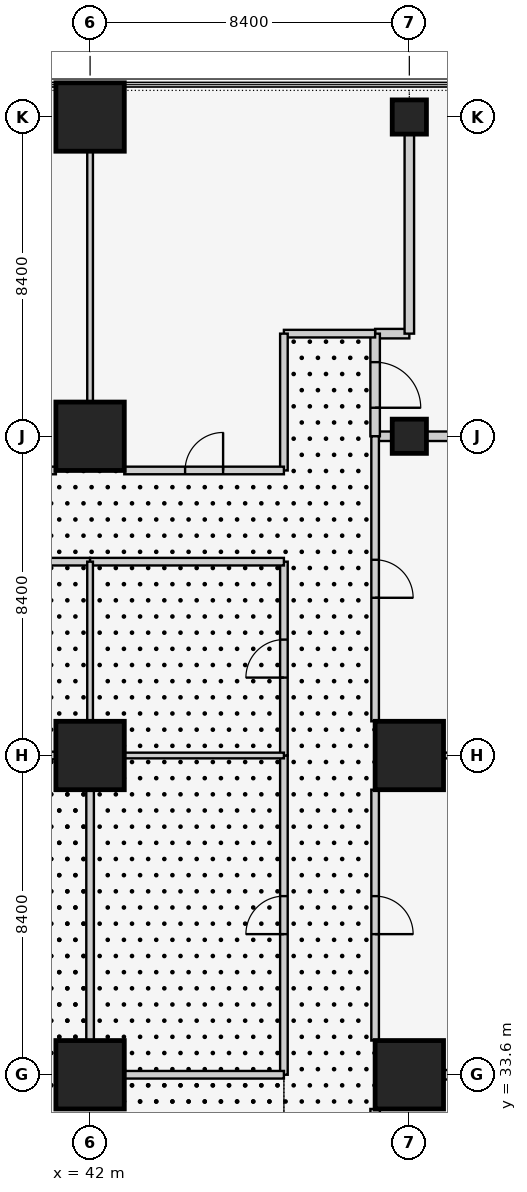
"""IFC4 building model, lengths in metres.
Left out: names, types, materials, properties, quantities, classifications, styles, units other than length and angle.
Written with IfcOpenShell. Run it as: python <this file> out.ifc"""

import sys

from ifc_helpers import new_model, si_unit, direction, frame, frame_2d, origin, origin_2d, place, context, subcontext, project, spatial, rectangle, extrude, element, fill, save


model = new_model("IFC4")
c1 = context("Model", 3, precision=1e-05, world=origin(), true_north=direction((0.0, 1.0)))
c2 = subcontext(c1, "Body", "Model", "MODEL_VIEW")
j1 = project(units=[si_unit("LENGTHUNIT", "METRE"), si_unit("PLANEANGLEUNIT", "RADIAN")], contexts=[c1])
p1 = place(None, origin())
s1 = spatial("IfcSite", under=j1, at=p1, CompositionType="ELEMENT")
p2 = place(p1, origin())
s2 = spatial("IfcBuilding", under=s1, at=p2, CompositionType="ELEMENT")
p3 = place(p2, frame((0.0, 0.0, 6.0)))
s3 = spatial("IfcBuildingStorey", under=s2, at=p3, CompositionType="ELEMENT", Elevation=6.0)
for number, where, z_axis, x_axis in (
    (1, (42.0, 33.6, 0.0), (0.0, 0.0, 1.0), (1.0, 0.0, 0.0)),
    (2, (42.0, 42.0, 0.0), (0.0, 0.0, 1.0), (1.0, 0.0, 0.0)),
    (3, (42.0, 50.4, 0.0), (0.0, 0.0, 1.0), (1.0, 0.0, 0.0)),
    (4, (42.0, 58.8, 0.0), (0.0, 0.0, 1.0), (1.0, 0.0, 0.0)),
    (5, (50.4, 33.6, 0.0), (0.0, 0.0, 1.0), (1.0, 0.0, 0.0)),
    (6, (50.4, 42.0, 0.0), (0.0, 0.0, 1.0), (1.0, 0.0, 0.0)),
):
    element("IfcColumn", number, at=place(p3, frame(where, z_axis=z_axis, x_axis=x_axis)), inside=s3, PredefinedType="COLUMN", context=c2, shape_type="SweptSolid", body=[
        extrude(rectangle(XDim=1.8, YDim=1.8, at=origin_2d()), origin(), (0.0, 0.0, 1.0), 4.5),
    ])
for number, where, z_axis, x_axis in (
    (7, (50.4, 50.4, 0.0), (0.0, 0.0, 1.0), (1.0, 0.0, 0.0)),
    (8, (50.4, 58.8, 0.0), (0.0, 0.0, 1.0), (1.0, 0.0, 0.0)),
):
    element("IfcColumn", number, at=place(p3, frame(where, z_axis=z_axis, x_axis=x_axis)), inside=s3, PredefinedType="COLUMN", context=c2, shape_type="SweptSolid", body=[
        extrude(rectangle(XDim=0.9, YDim=0.9, at=origin_2d()), origin(), (0.0, 0.0, 1.0), 4.5),
    ])
p4 = place(p3, frame((51.3, 33.6, 0.0), z_axis=(0.0, 0.0, 1.0), x_axis=(1.0, 0.0, 0.0)))
e9 = element("IfcWall", 9, at=p4, inside=s3, PredefinedType="SOLIDWALL", context=c2, shape_type="SweptSolid", body=[
    extrude(rectangle(XDim=6.6, YDim=0.25, at=frame_2d((3.3, 0.0))), origin(), (0.0, 0.0, 1.0), 3.543),
])
p5 = place(p3, frame((49.5, 26.1, 0.0), z_axis=(0.0, 0.0, 1.0), x_axis=(0.0, 1.0, 0.0)))
e10 = element("IfcWall", 10, at=p5, inside=s3, PredefinedType="SOLIDWALL", context=c2, shape_type="SweptSolid", body=[
    extrude(rectangle(XDim=6.6, YDim=0.25, at=frame_2d((3.3, 0.0))), origin(), (0.0, 0.0, 1.0), 4.3),
])
p6 = place(p5, frame((2.0, 0.0, 0.0)))
e11 = element("IfcOpeningElement", 11, at=p6, cuts=e10, PredefinedType="OPENING", context=c2, shape_type="SweptSolid", body=[
    extrude(rectangle(XDim=2.6, YDim=2.4, at=frame_2d((1.3, 1.2))), frame((0.0, 0.135, 0.0), z_axis=(0.0, -1.0, 0.0), x_axis=(1.0, 0.0, 0.0)), (0.0, 0.0, 1.0), 0.27),
])
p7 = place(p3, frame((49.95, 50.4, 0.0), z_axis=(0.0, 0.0, 1.0), x_axis=(-1.0, 0.0, 0.0)))
e12 = element("IfcWall", 12, at=p7, inside=s3, PredefinedType="SOLIDWALL", context=c2, shape_type="SweptSolid", body=[
    extrude(rectangle(XDim=0.45, YDim=0.25, at=frame_2d((0.225, 0.0))), origin(), (0.0, 0.0, 1.0), 3.543),
])
p8 = place(p3, frame((58.35, 50.4, 0.0), z_axis=(0.0, 0.0, 1.0), x_axis=(-1.0, 0.0, 0.0)))
e13 = element("IfcWall", 13, at=p8, inside=s3, PredefinedType="SOLIDWALL", context=c2, shape_type="SweptSolid", body=[
    extrude(rectangle(XDim=7.5, YDim=0.25, at=frame_2d((3.75, 0.0))), origin(), (0.0, 0.0, 1.0), 3.543),
])
p9 = place(p3, frame((49.5, 53.1, 0.0), z_axis=(0.0, 0.0, 1.0), x_axis=(1.0, 0.0, 0.0)))
e14 = element("IfcWall", 14, at=p9, inside=s3, PredefinedType="SOLIDWALL", context=c2, shape_type="SweptSolid", body=[
    extrude(rectangle(XDim=0.9, YDim=0.25, at=frame_2d((0.45, 0.0))), origin(), (0.0, 0.0, 1.0), 4.3),
])
p10 = place(p3, frame((50.4, 53.1, 0.0), z_axis=(0.0, 0.0, 1.0), x_axis=(0.0, 1.0, 0.0)))
e15 = element("IfcWall", 15, at=p10, inside=s3, PredefinedType="SOLIDWALL", context=c2, shape_type="SweptSolid", body=[
    extrude(rectangle(XDim=5.25, YDim=0.25, at=frame_2d((2.625, 0.0))), origin(), (0.0, 0.0, 1.0), 3.543),
])
p11 = place(p3, frame((49.5, 50.4, 0.0), z_axis=(0.0, 0.0, 1.0), x_axis=(0.0, 1.0, 0.0)))
e16 = element("IfcWall", 16, at=p11, inside=s3, PredefinedType="SOLIDWALL", context=c2, shape_type="SweptSolid", body=[
    extrude(rectangle(XDim=2.7, YDim=0.25, at=frame_2d((1.35, 0.0))), origin(), (0.0, 0.0, 1.0), 4.3),
])
p12 = place(p11, frame((0.75, 0.0, 0.0)))
e17 = element("IfcOpeningElement", 17, at=p12, cuts=e16, PredefinedType="OPENING", context=c2, shape_type="SweptSolid", body=[
    extrude(rectangle(XDim=1.2, YDim=2.1, at=frame_2d((0.6, 1.05))), frame((0.0, 0.135, 0.0), z_axis=(0.0, -1.0, 0.0), x_axis=(1.0, 0.0, 0.0)), (0.0, 0.0, 1.0), 0.27),
])
p13 = place(p3, frame((51.3, 42.0, 0.0), z_axis=(0.0, 0.0, 1.0), x_axis=(1.0, 0.0, 0.0)))
e18 = element("IfcWall", 18, at=p13, inside=s3, PredefinedType="PARTITIONING", context=c2, shape_type="SweptSolid", body=[
    extrude(rectangle(XDim=6.6, YDim=0.15, at=frame_2d((3.3, 0.0))), origin(), (0.0, 0.0, 1.0), 3.543),
])
p14 = place(p3, frame((49.5, 34.5, 0.0), z_axis=(0.0, 0.0, 1.0), x_axis=(0.0, 1.0, 0.0)))
e19 = element("IfcWall", 19, at=p14, inside=s3, PredefinedType="PARTITIONING", context=c2, shape_type="SweptSolid", body=[
    extrude(rectangle(XDim=6.6, YDim=0.2, at=frame_2d((3.3, 0.0))), origin(), (0.0, 0.0, 1.0), 4.3),
])
p15 = place(p14, frame((2.8, 0.0, 0.0)))
e20 = element("IfcOpeningElement", 20, at=p15, cuts=e19, PredefinedType="OPENING", context=c2, shape_type="SweptSolid", body=[
    extrude(rectangle(XDim=1.0, YDim=2.1, at=frame_2d((0.5, 1.05))), frame((0.0, 0.11, 0.0), z_axis=(0.0, -1.0, 0.0), x_axis=(1.0, 0.0, 0.0)), (0.0, 0.0, 1.0), 0.22),
])
p16 = place(p3, frame((49.5, 42.9, 0.0), z_axis=(0.0, 0.0, 1.0), x_axis=(0.0, 1.0, 0.0)))
e21 = element("IfcWall", 21, at=p16, inside=s3, PredefinedType="PARTITIONING", context=c2, shape_type="SweptSolid", body=[
    extrude(rectangle(XDim=7.5, YDim=0.2, at=frame_2d((3.75, 0.0))), origin(), (0.0, 0.0, 1.0), 4.3),
])
p17 = place(p16, frame((3.25, 0.0, 0.0)))
e22 = element("IfcOpeningElement", 22, at=p17, cuts=e21, PredefinedType="OPENING", context=c2, shape_type="SweptSolid", body=[
    extrude(rectangle(XDim=1.0, YDim=2.1, at=frame_2d((0.5, 1.05))), frame((0.0, 0.11, 0.0), z_axis=(0.0, -1.0, 0.0), x_axis=(1.0, 0.0, 0.0)), (0.0, 0.0, 1.0), 0.22),
])
p18 = place(p3, frame((42.0, 57.9, 0.0), z_axis=(0.0, 0.0, 1.0), x_axis=(0.0, -1.0, 0.0)))
e23 = element("IfcWall", 23, at=p18, inside=s3, PredefinedType="PARTITIONING", context=c2, shape_type="SweptSolid", body=[
    extrude(rectangle(XDim=6.6, YDim=0.15, at=frame_2d((3.3, 0.0))), origin(), (0.0, 0.0, 1.0), 3.543),
])
p19 = place(p3, frame((41.1, 49.5, 0.0), z_axis=(0.0, 0.0, 1.0), x_axis=(-1.0, 0.0, 0.0)))
e24 = element("IfcWall", 24, at=p19, inside=s3, PredefinedType="PARTITIONING", context=c2, shape_type="SweptSolid", body=[
    extrude(rectangle(XDim=6.6, YDim=0.2, at=frame_2d((3.3, 0.0))), origin(), (0.0, 0.0, 1.0), 4.3),
])
p20 = place(p19, frame((2.8, 0.0, 0.0)))
e25 = element("IfcOpeningElement", 25, at=p20, cuts=e24, PredefinedType="OPENING", context=c2, shape_type="SweptSolid", body=[
    extrude(rectangle(XDim=1.0, YDim=2.1, at=frame_2d((0.5, 1.05))), frame((0.0, 0.11, 0.0), z_axis=(0.0, -1.0, 0.0), x_axis=(1.0, 0.0, 0.0)), (0.0, 0.0, 1.0), 0.22),
])
p21 = place(p3, frame((49.5, 53.1, 0.0), z_axis=(0.0, 0.0, 1.0), x_axis=(-1.0, 0.0, 0.0)))
e26 = element("IfcWall", 26, at=p21, inside=s3, PredefinedType="PARTITIONING", context=c2, shape_type="SweptSolid", body=[
    extrude(rectangle(XDim=2.4, YDim=0.2, at=frame_2d((1.2, 0.0))), origin(), (0.0, 0.0, 1.0), 4.3),
])
p22 = place(p3, frame((47.1, 53.1, 0.0), z_axis=(0.0, 0.0, 1.0), x_axis=(0.0, -1.0, 0.0)))
e27 = element("IfcWall", 27, at=p22, inside=s3, PredefinedType="PARTITIONING", context=c2, shape_type="SweptSolid", body=[
    extrude(rectangle(XDim=3.6, YDim=0.2, at=frame_2d((1.8, 0.0))), origin(), (0.0, 0.0, 1.0), 4.3),
])
p23 = place(p3, frame((47.1, 49.5, 0.0), z_axis=(0.0, 0.0, 1.0), x_axis=(-1.0, 0.0, 0.0)))
e28 = element("IfcWall", 28, at=p23, inside=s3, PredefinedType="PARTITIONING", context=c2, shape_type="SweptSolid", body=[
    extrude(rectangle(XDim=4.2, YDim=0.2, at=frame_2d((2.1, 0.0))), origin(), (0.0, 0.0, 1.0), 4.3),
])
p24 = place(p23, frame((1.6, 0.0, 0.0)))
e29 = element("IfcOpeningElement", 29, at=p24, cuts=e28, PredefinedType="OPENING", context=c2, shape_type="SweptSolid", body=[
    extrude(rectangle(XDim=1.0, YDim=2.1, at=frame_2d((0.5, 1.05))), frame((0.0, 0.11, 0.0), z_axis=(0.0, -1.0, 0.0), x_axis=(1.0, 0.0, 0.0)), (0.0, 0.0, 1.0), 0.22),
])
p25 = place(p3, frame((47.1, 33.6, 0.0), z_axis=(0.0, 0.0, 1.0), x_axis=(0.0, 1.0, 0.0)))
e30 = element("IfcWall", 30, at=p25, inside=s3, PredefinedType="PARTITIONING", context=c2, shape_type="SweptSolid", body=[
    extrude(rectangle(XDim=8.4, YDim=0.2, at=frame_2d((4.2, 0.0))), origin(), (0.0, 0.0, 1.0), 4.3),
])
p26 = place(p25, frame((3.7, 0.0, 0.0)))
e31 = element("IfcOpeningElement", 31, at=p26, cuts=e30, PredefinedType="OPENING", context=c2, shape_type="SweptSolid", body=[
    extrude(rectangle(XDim=1.0, YDim=2.1, at=frame_2d((0.5, 1.05))), frame((0.0, 0.11, 0.0), z_axis=(0.0, -1.0, 0.0), x_axis=(1.0, 0.0, 0.0)), (0.0, 0.0, 1.0), 0.22),
])
p27 = place(p3, frame((42.0, 47.1, 0.0), z_axis=(0.0, 0.0, 1.0), x_axis=(-1.0, 0.0, 0.0)))
e32 = element("IfcWall", 32, at=p27, inside=s3, PredefinedType="PARTITIONING", context=c2, shape_type="SweptSolid", body=[
    extrude(rectangle(XDim=16.8, YDim=0.2, at=frame_2d((8.4, 0.0))), origin(), (0.0, 0.0, 1.0), 4.3),
])
p28 = place(p27, frame((7.9, 0.0, 0.0)))
e33 = element("IfcOpeningElement", 33, at=p28, cuts=e32, PredefinedType="OPENING", context=c2, shape_type="SweptSolid", body=[
    extrude(rectangle(XDim=1.0, YDim=2.1, at=frame_2d((0.5, 1.05))), frame((0.0, 0.11, 0.0), z_axis=(0.0, -1.0, 0.0), x_axis=(1.0, 0.0, 0.0)), (0.0, 0.0, 1.0), 0.22),
])
p29 = place(p3, frame((47.1, 42.0, 0.0), z_axis=(0.0, 0.0, 1.0), x_axis=(0.0, 1.0, 0.0)))
e34 = element("IfcWall", 34, at=p29, inside=s3, PredefinedType="PARTITIONING", context=c2, shape_type="SweptSolid", body=[
    extrude(rectangle(XDim=5.1, YDim=0.2, at=frame_2d((2.55, 0.0))), origin(), (0.0, 0.0, 1.0), 4.3),
])
p30 = place(p29, frame((2.05, 0.0, 0.0)))
e35 = element("IfcOpeningElement", 35, at=p30, cuts=e34, PredefinedType="OPENING", context=c2, shape_type="SweptSolid", body=[
    extrude(rectangle(XDim=1.0, YDim=2.1, at=frame_2d((0.5, 1.05))), frame((0.0, 0.11, 0.0), z_axis=(0.0, -1.0, 0.0), x_axis=(1.0, 0.0, 0.0)), (0.0, 0.0, 1.0), 0.22),
])
p31 = place(p3, frame((47.1, 47.1, 0.0), z_axis=(0.0, 0.0, 1.0), x_axis=(-1.0, 0.0, 0.0)))
e36 = element("IfcWall", 36, at=p31, inside=s3, PredefinedType="PARTITIONING", context=c2, shape_type="SweptSolid", body=[
    extrude(rectangle(XDim=5.1, YDim=0.2, at=frame_2d((2.55, 0.0))), origin(), (0.0, 0.0, 1.0), 4.3),
])
p32 = place(p3, frame((42.0, 41.1, 0.0), z_axis=(0.0, 0.0, 1.0), x_axis=(0.0, -1.0, 0.0)))
e37 = element("IfcWall", 37, at=p32, inside=s3, PredefinedType="PARTITIONING", context=c2, shape_type="SweptSolid", body=[
    extrude(rectangle(XDim=6.6, YDim=0.2, at=frame_2d((3.3, 0.0))), origin(), (0.0, 0.0, 1.0), 3.543),
])
p33 = place(p3, frame((42.9, 33.6, 0.0), z_axis=(0.0, 0.0, 1.0), x_axis=(1.0, 0.0, 0.0)))
e38 = element("IfcWall", 38, at=p33, inside=s3, PredefinedType="PARTITIONING", context=c2, shape_type="SweptSolid", body=[
    extrude(rectangle(XDim=4.2, YDim=0.2, at=frame_2d((2.1, 0.0))), origin(), (0.0, 0.0, 1.0), 3.543),
])
p34 = place(p3, frame((34.5, 42.0, 0.0), z_axis=(0.0, 0.0, 1.0), x_axis=(1.0, 0.0, 0.0)))
e39 = element("IfcWall", 39, at=p34, inside=s3, PredefinedType="PARTITIONING", context=c2, shape_type="SweptSolid", body=[
    extrude(rectangle(XDim=6.6, YDim=0.2, at=frame_2d((3.3, 0.0))), origin(), (0.0, 0.0, 1.0), 3.543),
])
for number, where, z_axis, x_axis in (
    (40, (42.9, 42.0, 0.0), (0.0, 0.0, 1.0), (1.0, 0.0, 0.0)),
    (41, (42.0, 47.1, 0.0), (0.0, 0.0, 1.0), (0.0, -1.0, 0.0)),
):
    element("IfcWall", number, at=place(p3, frame(where, z_axis=z_axis, x_axis=x_axis)), inside=s3, PredefinedType="PARTITIONING", context=c2, shape_type="SweptSolid", body=[
        extrude(rectangle(XDim=4.2, YDim=0.15, at=frame_2d((2.1, 0.0))), origin(), (0.0, 0.0, 1.0), 3.543),
    ])
p35 = place(p12, frame((1.2, 0.0, 0.0), z_axis=(0.0, 0.0, 1.0), x_axis=(-1.0, 0.0, 0.0)))
e42 = element("IfcDoor", 42, at=p35, inside=s3, OperationType="SINGLE_SWING_RIGHT", PredefinedType="DOOR", context=c2, shape_type="SweptSolid", body=[
    extrude(rectangle(XDim=1.2, YDim=2.1, at=frame_2d((0.6, 1.05))), frame((0.0, 0.025, 0.0), z_axis=(0.0, -1.0, 0.0), x_axis=(1.0, 0.0, 0.0)), (0.0, 0.0, 1.0), 0.05),
])
fill(e17, e42)
p36 = place(p15, frame((1.0, 0.0, 0.0), z_axis=(0.0, 0.0, 1.0), x_axis=(-1.0, 0.0, 0.0)))
e43 = element("IfcDoor", 43, at=p36, inside=s3, OperationType="SINGLE_SWING_RIGHT", PredefinedType="DOOR", context=c2, shape_type="SweptSolid", body=[
    extrude(rectangle(XDim=1.0, YDim=2.1, at=frame_2d((0.5, 1.05))), frame((0.0, 0.025, 0.0), z_axis=(0.0, -1.0, 0.0), x_axis=(1.0, 0.0, 0.0)), (0.0, 0.0, 1.0), 0.05),
])
fill(e20, e43)
p37 = place(p17, frame((1.0, 0.0, 0.0), z_axis=(0.0, 0.0, 1.0), x_axis=(-1.0, 0.0, 0.0)))
e44 = element("IfcDoor", 44, at=p37, inside=s3, OperationType="SINGLE_SWING_RIGHT", PredefinedType="DOOR", context=c2, shape_type="SweptSolid", body=[
    extrude(rectangle(XDim=1.0, YDim=2.1, at=frame_2d((0.5, 1.05))), frame((0.0, 0.025, 0.0), z_axis=(0.0, -1.0, 0.0), x_axis=(1.0, 0.0, 0.0)), (0.0, 0.0, 1.0), 0.05),
])
fill(e22, e44)
p38 = place(p24, frame((1.0, 0.0, 0.0), z_axis=(0.0, 0.0, 1.0), x_axis=(-1.0, 0.0, 0.0)))
e45 = element("IfcDoor", 45, at=p38, inside=s3, OperationType="SINGLE_SWING_RIGHT", PredefinedType="DOOR", context=c2, shape_type="SweptSolid", body=[
    extrude(rectangle(XDim=1.0, YDim=2.1, at=frame_2d((0.5, 1.05))), frame((0.0, 0.025, 0.0), z_axis=(0.0, -1.0, 0.0), x_axis=(1.0, 0.0, 0.0)), (0.0, 0.0, 1.0), 0.05),
])
fill(e29, e45)
p39 = place(p26, origin())
e46 = element("IfcDoor", 46, at=p39, inside=s3, OperationType="SINGLE_SWING_LEFT", PredefinedType="DOOR", context=c2, shape_type="SweptSolid", body=[
    extrude(rectangle(XDim=1.0, YDim=2.1, at=frame_2d((0.5, 1.05))), frame((0.0, 0.025, 0.0), z_axis=(0.0, -1.0, 0.0), x_axis=(1.0, 0.0, 0.0)), (0.0, 0.0, 1.0), 0.05),
])
fill(e31, e46)
p40 = place(p30, origin())
e47 = element("IfcDoor", 47, at=p40, inside=s3, OperationType="SINGLE_SWING_LEFT", PredefinedType="DOOR", context=c2, shape_type="SweptSolid", body=[
    extrude(rectangle(XDim=1.0, YDim=2.1, at=frame_2d((0.5, 1.05))), frame((0.0, 0.025, 0.0), z_axis=(0.0, -1.0, 0.0), x_axis=(1.0, 0.0, 0.0)), (0.0, 0.0, 1.0), 0.05),
])
fill(e35, e47)
save(model, sys.argv[1])
